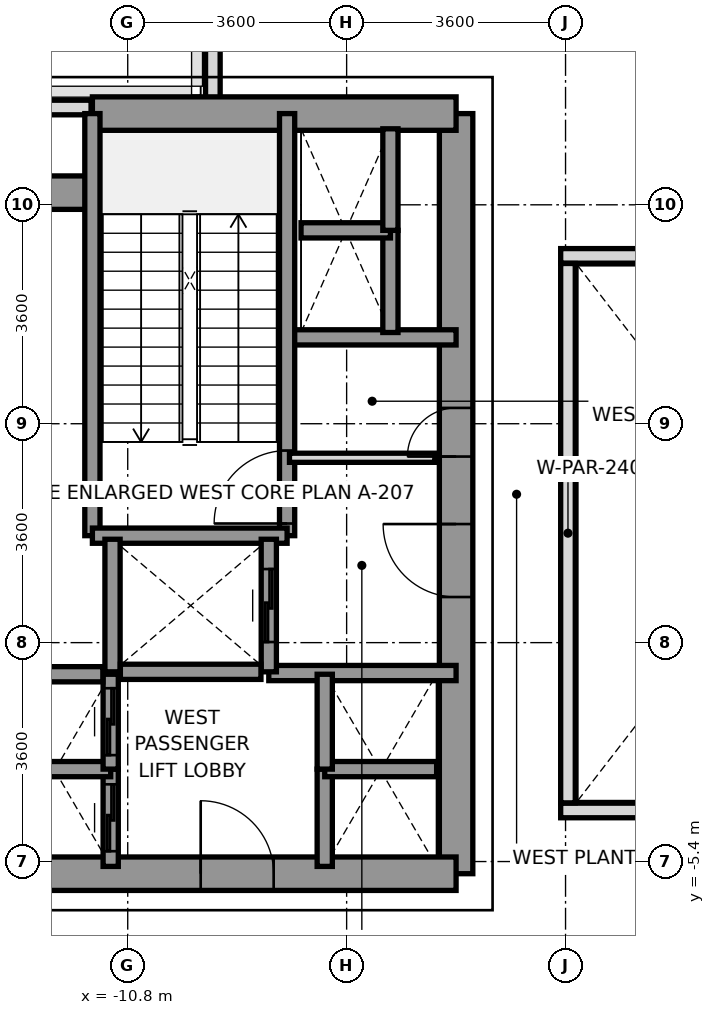
"""IFC4 building model, lengths in metres.
Left out: names, types, materials, properties, quantities, classifications, styles, units other than length and angle.
Written with IfcOpenShell. Run it as: python <this file> out.ifc"""

import sys

from ifc_helpers import new_model, si_unit, direction, frame, frame_2d, origin, place, context, subcontext, project, spatial, rectangle, extrude, source, transform, mapped, element, fill, save


model = new_model("IFC4")
c1 = context("Model", 3, precision=1e-05, world=origin(), true_north=direction((0.0, 1.0)))
c2 = subcontext(c1, "Body", "Model", "MODEL_VIEW")
j1 = project(units=[si_unit("LENGTHUNIT", "METRE"), si_unit("PLANEANGLEUNIT", "RADIAN")], contexts=[c1])
p1 = place(None, origin())
s1 = spatial("IfcSite", under=j1, at=p1, CompositionType="ELEMENT")
p2 = place(p1, origin())
s2 = spatial("IfcBuilding", under=s1, at=p2, CompositionType="ELEMENT")
p3 = place(p2, frame((0.0, 0.0, 88.4)))
s3 = spatial("IfcBuildingStorey", under=s2, at=p3, CompositionType="ELEMENT", Elevation=88.4)
p4 = place(p3, frame((-14.022, 7.0, 0.0), z_axis=(0.0, 0.0, 1.0), x_axis=(1.0, 0.0, 0.0)))
e1 = element("IfcWall", 1, at=p4, inside=s3, PredefinedType="PARAPET", context=c2, shape_type="SweptSolid", body=[
    extrude(rectangle(XDim=2.619, YDim=0.24, at=frame_2d((1.31, 0.0))), origin(), (0.0, 0.0, 1.0), 1.15),
])
p5 = place(p3, frame((-9.4, 6.953, 0.0), z_axis=(0.0, 0.0, 1.0), x_axis=(0.0, 1.0, 0.0)))
e2 = element("IfcWall", 2, at=p5, inside=s3, PredefinedType="PARAPET", context=c2, shape_type="SweptSolid", body=[
    extrude(rectangle(XDim=1.444, YDim=0.24, at=frame_2d((0.722, 0.0))), origin(), (0.0, 0.0, 1.0), 1.15),
])
p6 = place(p3, frame((-5.4, -5.6, 0.0), z_axis=(0.0, 0.0, 1.0), x_axis=(0.0, 1.0, 0.0)))
e3 = element("IfcWall", 3, at=p6, inside=s3, PredefinedType="SHEAR", context=c2, shape_type="SweptSolid", body=[
    extrude(rectangle(XDim=12.5, YDim=0.55, at=frame_2d((6.25, 0.0))), origin(), (0.0, 0.0, 1.0), 4.4),
])
p7 = place(p6, frame((4.55, 0.0, 0.0)))
e4 = element("IfcOpeningElement", 4, at=p7, cuts=e3, PredefinedType="OPENING", context=c2, shape_type="SweptSolid", body=[
    extrude(rectangle(XDim=1.2, YDim=2.2, at=frame_2d((0.6, 1.1))), frame((0.0, 0.285, 0.0), z_axis=(0.0, -1.0, 0.0), x_axis=(1.0, 0.0, 0.0)), (0.0, 0.0, 1.0), 0.57),
])
p8 = place(p6, frame((6.86, 0.0, 0.0)))
e5 = element("IfcOpeningElement", 5, at=p8, cuts=e3, PredefinedType="OPENING", context=c2, shape_type="SweptSolid", body=[
    extrude(rectangle(XDim=0.8, YDim=2.1, at=frame_2d((0.4, 1.05))), frame((0.0, 0.285, 0.0), z_axis=(0.0, -1.0, 0.0), x_axis=(1.0, 0.0, 0.0)), (0.0, 0.0, 1.0), 0.57),
])
p9 = place(p3, frame((-11.381, 6.9, 0.0), z_axis=(0.0, 0.0, 1.0), x_axis=(1.0, 0.0, 0.0)))
e6 = element("IfcWall", 6, at=p9, inside=s3, PredefinedType="SHEAR", context=c2, shape_type="SweptSolid", body=[
    extrude(rectangle(XDim=5.981, YDim=0.55, at=frame_2d((2.991, 0.0))), origin(), (0.0, 0.0, 1.0), 4.4),
])
p10 = place(p3, frame((-13.2, 5.6, 0.0), z_axis=(0.0, 0.0, 1.0), x_axis=(1.0, 0.0, 0.0)))
e7 = element("IfcWall", 7, at=p10, inside=s3, PredefinedType="SHEAR", context=c2, shape_type="SweptSolid", body=[
    extrude(rectangle(XDim=1.819, YDim=0.55, at=frame_2d((0.909, 0.0))), origin(), (0.0, 0.0, 1.0), 4.4),
])
p11 = place(p3, frame((-13.2, -5.6, 0.0), z_axis=(0.0, 0.0, 1.0), x_axis=(1.0, 0.0, 0.0)))
e8 = element("IfcWall", 8, at=p11, inside=s3, PredefinedType="SHEAR", context=c2, shape_type="SweptSolid", body=[
    extrude(rectangle(XDim=7.8, YDim=0.55, at=frame_2d((3.9, 0.0))), origin(), (0.0, 0.0, 1.0), 4.4),
])
p12 = place(p11, frame((3.6, 0.0, 0.0)))
e9 = element("IfcOpeningElement", 9, at=p12, cuts=e8, PredefinedType="OPENING", context=c2, shape_type="SweptSolid", body=[
    extrude(rectangle(XDim=1.2, YDim=2.2, at=frame_2d((0.6, 1.1))), frame((0.0, 0.285, 0.0), z_axis=(0.0, -1.0, 0.0), x_axis=(1.0, 0.0, 0.0)), (0.0, 0.0, 1.0), 0.57),
])
p13 = place(p3, frame((-8.18, 3.22, 0.0), z_axis=(0.0, 0.0, 1.0), x_axis=(1.0, 0.0, 0.0)))
e10 = element("IfcWall", 10, at=p13, inside=s3, PredefinedType="SOLIDWALL", context=c2, shape_type="SweptSolid", body=[
    extrude(rectangle(XDim=2.78, YDim=0.25, at=frame_2d((1.39, 0.0))), origin(), (0.0, 0.0, 1.0), 4.4),
])
p14 = place(p3, frame((-8.48, -2.3, 0.0), z_axis=(0.0, 0.0, 1.0), x_axis=(1.0, 0.0, 0.0)))
e11 = element("IfcWall", 11, at=p14, inside=s3, PredefinedType="SOLIDWALL", context=c2, shape_type="SweptSolid", body=[
    extrude(rectangle(XDim=3.08, YDim=0.25, at=frame_2d((1.54, 0.0))), origin(), (0.0, 0.0, 1.0), 4.4),
])
p15 = place(p3, frame((-8.179, -0.041, 0.0), z_axis=(0.0, 0.0, 1.0), x_axis=(0.0, 1.0, 0.0)))
e12 = element("IfcWall", 12, at=p15, inside=s3, PredefinedType="SOLIDWALL", context=c2, shape_type="SweptSolid", body=[
    extrude(rectangle(XDim=6.941, YDim=0.25, at=frame_2d((3.47, 0.0))), origin(), (0.0, 0.0, 1.0), 4.4),
])
p16 = place(p15, frame((0.2, 0.0, 0.0)))
e13 = element("IfcOpeningElement", 13, at=p16, cuts=e12, PredefinedType="OPENING", context=c2, shape_type="SweptSolid", body=[
    extrude(rectangle(XDim=1.2, YDim=2.2, at=frame_2d((0.6, 1.1))), frame((0.0, 0.135, 0.0), z_axis=(0.0, -1.0, 0.0), x_axis=(1.0, 0.0, 0.0)), (0.0, 0.0, 1.0), 0.27),
])
p17 = place(p3, frame((-11.381, -0.041, 0.0), z_axis=(0.0, 0.0, 1.0), x_axis=(0.0, 1.0, 0.0)))
e14 = element("IfcWall", 14, at=p17, inside=s3, PredefinedType="SOLIDWALL", context=c2, shape_type="SweptSolid", body=[
    extrude(rectangle(XDim=6.941, YDim=0.25, at=frame_2d((3.47, 0.0))), origin(), (0.0, 0.0, 1.0), 4.4),
])
p18 = place(p3, frame((-11.381, -0.041, 0.0), z_axis=(0.0, 0.0, 1.0), x_axis=(1.0, 0.0, 0.0)))
e15 = element("IfcWall", 15, at=p18, inside=s3, PredefinedType="SOLIDWALL", context=c2, shape_type="SweptSolid", body=[
    extrude(rectangle(XDim=3.202, YDim=0.25, at=frame_2d((1.601, 0.0))), origin(), (0.0, 0.0, 1.0), 4.4),
])
p19 = place(p3, frame((-11.05, -2.28, 0.0), z_axis=(0.0, 0.0, 1.0), x_axis=(0.0, 1.0, 0.0)))
e16 = element("IfcWall", 16, at=p19, inside=s3, PredefinedType="SOLIDWALL", context=c2, shape_type="SweptSolid", body=[
    extrude(rectangle(XDim=2.18, YDim=0.25, at=frame_2d((1.09, 0.0))), origin(), (0.0, 0.0, 1.0), 4.4),
])
p20 = place(p3, frame((-8.48, -2.28, 0.0), z_axis=(0.0, 0.0, 1.0), x_axis=(0.0, 1.0, 0.0)))
e17 = element("IfcWall", 17, at=p20, inside=s3, PredefinedType="SOLIDWALL", context=c2, shape_type="SweptSolid", body=[
    extrude(rectangle(XDim=2.18, YDim=0.25, at=frame_2d((1.09, 0.0))), origin(), (0.0, 0.0, 1.0), 4.4),
])
p21 = place(p20, frame((0.49, 0.0, 0.0)))
e18 = element("IfcOpeningElement", 18, at=p21, cuts=e17, PredefinedType="OPENING", context=c2, shape_type="SweptSolid", body=[
    extrude(rectangle(XDim=1.2, YDim=2.2, at=frame_2d((0.6, 1.1))), frame((0.0, 0.135, 0.0), z_axis=(0.0, -1.0, 0.0), x_axis=(1.0, 0.0, 0.0)), (0.0, 0.0, 1.0), 0.27),
])
p22 = place(p3, frame((-10.921, -2.28, 0.0), z_axis=(0.0, 0.0, 1.0), x_axis=(1.0, 0.0, 0.0)))
e19 = element("IfcWall", 19, at=p22, inside=s3, PredefinedType="SOLIDWALL", context=c2, shape_type="SweptSolid", body=[
    extrude(rectangle(XDim=2.312, YDim=0.25, at=frame_2d((1.156, 0.0))), origin(), (0.0, 0.0, 1.0), 4.4),
])
p23 = place(p3, frame((-11.08, -5.48, 0.0), z_axis=(0.0, 0.0, 1.0), x_axis=(0.0, 1.0, 0.0)))
e20 = element("IfcWall", 20, at=p23, inside=s3, PredefinedType="SOLIDWALL", context=c2, shape_type="SweptSolid", body=[
    extrude(rectangle(XDim=1.6, YDim=0.25, at=frame_2d((0.8, 0.0))), origin(), (0.0, 0.0, 1.0), 4.4),
])
p24 = place(p23, frame((0.25, 0.0, 0.0)))
e21 = element("IfcOpeningElement", 21, at=p24, cuts=e20, PredefinedType="OPENING", context=c2, shape_type="SweptSolid", body=[
    extrude(rectangle(XDim=1.1, YDim=2.2, at=frame_2d((0.55, 1.1))), frame((0.0, 0.135, 0.0), z_axis=(0.0, -1.0, 0.0), x_axis=(1.0, 0.0, 0.0)), (0.0, 0.0, 1.0), 0.27),
])
p25 = place(p3, frame((-12.92, -3.88, 0.0), z_axis=(0.0, 0.0, 1.0), x_axis=(1.0, 0.0, 0.0)))
e22 = element("IfcWall", 22, at=p25, inside=s3, PredefinedType="SOLIDWALL", context=c2, shape_type="SweptSolid", body=[
    extrude(rectangle(XDim=1.84, YDim=0.25, at=frame_2d((0.92, 0.0))), origin(), (0.0, 0.0, 1.0), 4.4),
])
p26 = place(p3, frame((-11.08, -3.88, 0.0), z_axis=(0.0, 0.0, 1.0), x_axis=(0.0, 1.0, 0.0)))
e23 = element("IfcWall", 23, at=p26, inside=s3, PredefinedType="SOLIDWALL", context=c2, shape_type="SweptSolid", body=[
    extrude(rectangle(XDim=1.56, YDim=0.25, at=frame_2d((0.78, 0.0))), origin(), (0.0, 0.0, 1.0), 4.4),
])
p27 = place(p26, frame((0.23, 0.0, 0.0)))
e24 = element("IfcOpeningElement", 24, at=p27, cuts=e23, PredefinedType="OPENING", context=c2, shape_type="SweptSolid", body=[
    extrude(rectangle(XDim=1.1, YDim=2.2, at=frame_2d((0.55, 1.1))), frame((0.0, 0.135, 0.0), z_axis=(0.0, -1.0, 0.0), x_axis=(1.0, 0.0, 0.0)), (0.0, 0.0, 1.0), 0.27),
])
p28 = place(p3, frame((-12.791, -2.32, 0.0), z_axis=(0.0, 0.0, 1.0), x_axis=(1.0, 0.0, 0.0)))
e25 = element("IfcWall", 25, at=p28, inside=s3, PredefinedType="SOLIDWALL", context=c2, shape_type="SweptSolid", body=[
    extrude(rectangle(XDim=1.582, YDim=0.25, at=frame_2d((0.791, 0.0))), origin(), (0.0, 0.0, 1.0), 4.4),
])
p29 = place(p3, frame((-7.56, -5.48, 0.0), z_axis=(0.0, 0.0, 1.0), x_axis=(0.0, 1.0, 0.0)))
e26 = element("IfcWall", 26, at=p29, inside=s3, PredefinedType="SOLIDWALL", context=c2, shape_type="SweptSolid", body=[
    extrude(rectangle(XDim=1.6, YDim=0.25, at=frame_2d((0.8, 0.0))), origin(), (0.0, 0.0, 1.0), 4.4),
])
p30 = place(p3, frame((-7.56, -3.88, 0.0), z_axis=(0.0, 0.0, 1.0), x_axis=(1.0, 0.0, 0.0)))
e27 = element("IfcWall", 27, at=p30, inside=s3, PredefinedType="SOLIDWALL", context=c2, shape_type="SweptSolid", body=[
    extrude(rectangle(XDim=1.84, YDim=0.25, at=frame_2d((0.92, 0.0))), origin(), (0.0, 0.0, 1.0), 4.4),
])
p31 = place(p3, frame((-7.56, -3.88, 0.0), z_axis=(0.0, 0.0, 1.0), x_axis=(0.0, 1.0, 0.0)))
e28 = element("IfcWall", 28, at=p31, inside=s3, PredefinedType="SOLIDWALL", context=c2, shape_type="SweptSolid", body=[
    extrude(rectangle(XDim=1.56, YDim=0.25, at=frame_2d((0.78, 0.0))), origin(), (0.0, 0.0, 1.0), 4.4),
])
p32 = place(p3, frame((-6.48, 3.3, 0.0), z_axis=(0.0, 0.0, 1.0), x_axis=(0.0, 1.0, 0.0)))
e29 = element("IfcWall", 29, at=p32, inside=s3, PredefinedType="SOLIDWALL", context=c2, shape_type="SweptSolid", body=[
    extrude(rectangle(XDim=1.68, YDim=0.25, at=frame_2d((0.84, 0.0))), origin(), (0.0, 0.0, 1.0), 4.4),
])
p33 = place(p3, frame((-7.95, 4.98, 0.0), z_axis=(0.0, 0.0, 1.0), x_axis=(1.0, 0.0, 0.0)))
e30 = element("IfcWall", 30, at=p33, inside=s3, PredefinedType="SOLIDWALL", context=c2, shape_type="SweptSolid", body=[
    extrude(rectangle(XDim=1.47, YDim=0.25, at=frame_2d((0.735, 0.0))), origin(), (0.0, 0.0, 1.0), 4.4),
])
p34 = place(p3, frame((-6.48, 4.98, 0.0), z_axis=(0.0, 0.0, 1.0), x_axis=(0.0, 1.0, 0.0)))
e31 = element("IfcWall", 31, at=p34, inside=s3, PredefinedType="SOLIDWALL", context=c2, shape_type="SweptSolid", body=[
    extrude(rectangle(XDim=1.67, YDim=0.25, at=frame_2d((0.835, 0.0))), origin(), (0.0, 0.0, 1.0), 4.4),
])
p35 = place(p3, frame((-8.14, 1.24, 0.0), z_axis=(0.0, 0.0, 1.0), x_axis=(1.0, 0.0, 0.0)))
e32 = element("IfcWall", 32, at=p35, inside=s3, PredefinedType="PARTITIONING", context=c2, shape_type="SweptSolid", body=[
    extrude(rectangle(XDim=2.39, YDim=0.15, at=frame_2d((1.195, 0.0))), origin(), (0.0, 0.0, 1.0), 3.5),
])
for number, where, z_axis, x_axis in (
    (33, (-3.68, -4.56, 0.0), (0.0, 0.0, 1.0), (1.0, 0.0, 0.0)),
    (34, (-3.68, 4.56, 0.0), (0.0, 0.0, 1.0), (1.0, 0.0, 0.0)),
):
    element("IfcWall", number, at=place(p3, frame(where, z_axis=z_axis, x_axis=x_axis)), inside=s3, PredefinedType="PARAPET", context=c2, shape_type="SweptSolid", body=[
        extrude(rectangle(XDim=7.36, YDim=0.24, at=frame_2d((3.68, 0.0))), origin(), (0.0, 0.0, 1.0), 1.15),
    ])
p36 = place(p3, frame((-3.56, -4.435, 0.0), z_axis=(0.0, 0.0, 1.0), x_axis=(0.0, 1.0, 0.0)))
e35 = element("IfcWall", 35, at=p36, inside=s3, PredefinedType="PARAPET", context=c2, shape_type="SweptSolid", body=[
    extrude(rectangle(XDim=8.87, YDim=0.24, at=frame_2d((4.435, 0.0))), origin(), (0.0, 0.0, 1.0), 1.15),
])
m1 = source(origin(), c2, "Body", "SweptSolid", [
    extrude(rectangle(XDim=1.2, YDim=2.2, at=frame_2d((0.6, 1.1))), frame((0.0, 0.025, 0.0), z_axis=(0.0, -1.0, 0.0), x_axis=(1.0, 0.0, 0.0)), (0.0, 0.0, 1.0), 0.05),
])
p37 = place(p16, origin())
e36 = element("IfcDoor", 36, at=p37, inside=s3, OperationType="SINGLE_SWING_LEFT", PredefinedType="DOOR", context=c2, shape_type="MappedRepresentation", body=[
    mapped(m1, transform((0.0, 0.0, 0.0), x_axis=(1.0, 0.0, 0.0), y_axis=(0.0, 1.0, 0.0), z_axis=(0.0, 0.0, 1.0), scale=1.0)),
])
fill(e13, e36)
p38 = place(p7, origin())
e37 = element("IfcDoor", 37, at=p38, inside=s3, OperationType="SINGLE_SWING_RIGHT", PredefinedType="DOOR", context=c2, shape_type="MappedRepresentation", body=[
    mapped(m1, transform((0.0, 0.0, 0.0), x_axis=(1.0, 0.0, 0.0), y_axis=(0.0, 1.0, 0.0), z_axis=(0.0, 0.0, 1.0), scale=1.0)),
])
fill(e4, e37)
p39 = place(p12, origin())
e38 = element("IfcDoor", 38, at=p39, inside=s3, OperationType="SINGLE_SWING_LEFT", PredefinedType="DOOR", context=c2, shape_type="MappedRepresentation", body=[
    mapped(m1, transform((0.0, 0.0, 0.0), x_axis=(1.0, 0.0, 0.0), y_axis=(0.0, 1.0, 0.0), z_axis=(0.0, 0.0, 1.0), scale=1.0)),
])
fill(e9, e38)
m2 = source(origin(), c2, "Body", "SweptSolid", [
    extrude(rectangle(XDim=0.8, YDim=2.1, at=frame_2d((0.4, 1.05))), frame((0.0, 0.025, 0.0), z_axis=(0.0, -1.0, 0.0), x_axis=(1.0, 0.0, 0.0)), (0.0, 0.0, 1.0), 0.05),
])
p40 = place(p8, origin())
e39 = element("IfcDoor", 39, at=p40, inside=s3, OperationType="SINGLE_SWING_LEFT", PredefinedType="DOOR", context=c2, shape_type="MappedRepresentation", body=[
    mapped(m2, transform((0.0, 0.0, 0.0), x_axis=(1.0, 0.0, 0.0), y_axis=(0.0, 1.0, 0.0), z_axis=(0.0, 0.0, 1.0), scale=1.0)),
])
fill(e5, e39)
p41 = place(p21, origin())
e40 = element("IfcDoor", 40, at=p41, inside=s3, OperationType="SLIDING_TO_RIGHT", PredefinedType="DOOR", context=c2, shape_type="MappedRepresentation", body=[
    mapped(m1, transform((0.0, 0.0, 0.0), x_axis=(1.0, 0.0, 0.0), y_axis=(0.0, 1.0, 0.0), z_axis=(0.0, 0.0, 1.0), scale=1.0)),
])
fill(e18, e40)
m3 = source(origin(), c2, "Body", "SweptSolid", [
    extrude(rectangle(XDim=1.1, YDim=2.2, at=frame_2d((0.55, 1.1))), frame((0.0, 0.025, 0.0), z_axis=(0.0, -1.0, 0.0), x_axis=(1.0, 0.0, 0.0)), (0.0, 0.0, 1.0), 0.05),
])
p42 = place(p24, origin())
e41 = element("IfcDoor", 41, at=p42, inside=s3, OperationType="SLIDING_TO_LEFT", PredefinedType="DOOR", context=c2, shape_type="MappedRepresentation", body=[
    mapped(m3, transform((0.0, 0.0, 0.0), x_axis=(1.0, 0.0, 0.0), y_axis=(0.0, 1.0, 0.0), z_axis=(0.0, 0.0, 1.0), scale=1.0)),
])
fill(e21, e41)
p43 = place(p27, origin())
e42 = element("IfcDoor", 42, at=p43, inside=s3, OperationType="SLIDING_TO_LEFT", PredefinedType="DOOR", context=c2, shape_type="MappedRepresentation", body=[
    mapped(m3, transform((0.0, 0.0, 0.0), x_axis=(1.0, 0.0, 0.0), y_axis=(0.0, 1.0, 0.0), z_axis=(0.0, 0.0, 1.0), scale=1.0)),
])
fill(e24, e42)
save(model, sys.argv[1])
